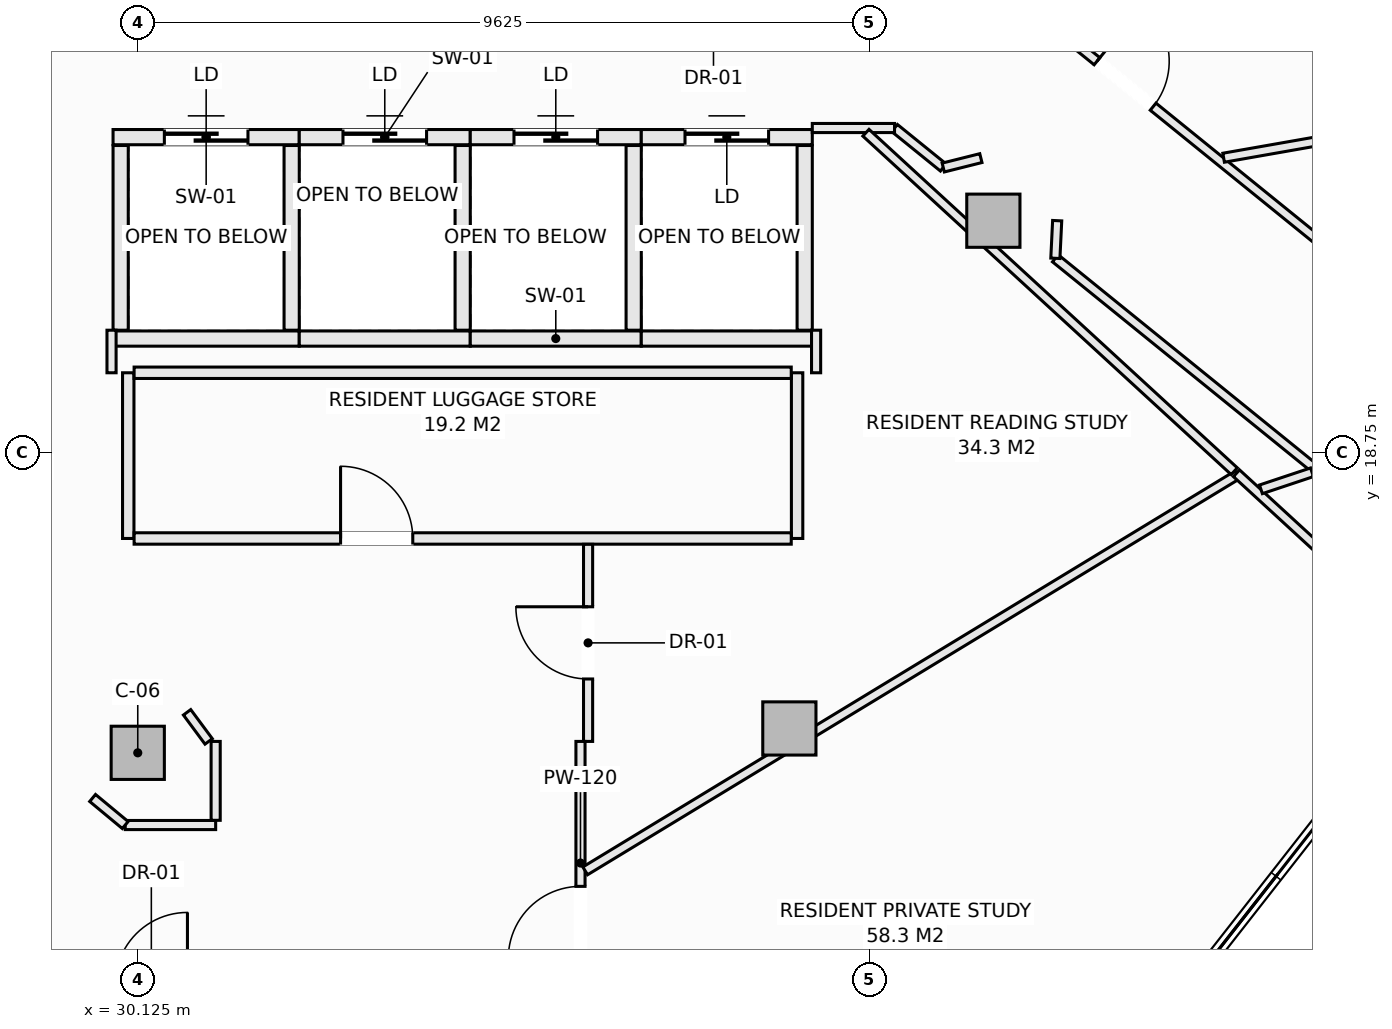
"""IFC4 building model, lengths in metres.
Left out: names, types, materials, properties, quantities, classifications, styles, units other than length and angle.
Written with IfcOpenShell. Run it as: python <this file> out.ifc"""

import sys

from ifc_helpers import new_model, si_unit, direction, frame, frame_2d, origin, origin_2d, place, context, subcontext, project, spatial, rectangle, extrude, element, fill, save


model = new_model("IFC4")
c1 = context("Model", 3, precision=1e-05, world=origin(), true_north=direction((0.0, 1.0)))
c2 = subcontext(c1, "Body", "Model", "MODEL_VIEW")
j1 = project(units=[si_unit("LENGTHUNIT", "METRE"), si_unit("PLANEANGLEUNIT", "RADIAN")], contexts=[c1])
p1 = place(None, origin())
s1 = spatial("IfcSite", under=j1, at=p1, CompositionType="ELEMENT")
p2 = place(p1, origin())
s2 = spatial("IfcBuilding", under=s1, at=p2, CompositionType="ELEMENT")
p3 = place(p2, frame((0.0, 0.0, 219.5)))
s3 = spatial("IfcBuildingStorey", under=s2, at=p3, CompositionType="ELEMENT", Elevation=219.5)
for number, where, z_axis, x_axis in (
    (1, (30.125, 14.8, -0.27), (0.0, 0.0, 1.0), (1.0, 0.0, 0.0)),
    (2, (38.698, 15.121, -0.27), (0.0, 0.0, 1.0), (1.0, 0.0, 0.0)),
    (3, (41.382, 21.801, -0.27), (0.0, 0.0, 1.0), (1.0, 0.0, 0.0)),
):
    element("IfcColumn", number, at=place(p3, frame(where, z_axis=z_axis, x_axis=x_axis)), inside=s3, PredefinedType="COLUMN", context=c2, shape_type="SweptSolid", body=[
        extrude(rectangle(XDim=0.7, YDim=0.7, at=origin_2d()), origin(), (0.0, 0.0, 1.0), 3.3),
    ])
p4 = place(p3, frame((29.8, 22.9, 0.0), z_axis=(0.0, 0.0, 1.0), x_axis=(1.0, 0.0, 0.0)))
e4 = element("IfcWall", 4, at=p4, inside=s3, PredefinedType="SOLIDWALL", context=c2, shape_type="SweptSolid", body=[
    extrude(rectangle(XDim=2.45, YDim=0.2, at=frame_2d((1.225, 0.0))), origin(), (0.0, 0.0, 1.0), 3.03),
])
p5 = place(p4, frame((0.675, 0.0, 0.0)))
e5 = element("IfcOpeningElement", 5, at=p5, cuts=e4, PredefinedType="OPENING", context=c2, shape_type="SweptSolid", body=[
    extrude(rectangle(XDim=1.1, YDim=2.2, at=frame_2d((0.55, 1.1))), frame((0.0, 0.11, 0.0), z_axis=(0.0, -1.0, 0.0), x_axis=(1.0, 0.0, 0.0)), (0.0, 0.0, 1.0), 0.22),
])
p6 = place(p3, frame((29.8, 20.25, 0.0), z_axis=(0.0, 0.0, 1.0), x_axis=(1.0, 0.0, 0.0)))
e6 = element("IfcWall", 6, at=p6, inside=s3, PredefinedType="SOLIDWALL", context=c2, shape_type="SweptSolid", body=[
    extrude(rectangle(XDim=2.45, YDim=0.2, at=frame_2d((1.225, 0.0))), origin(), (0.0, 0.0, 1.0), 3.03),
])
for number, where, z_axis, x_axis in (
    (7, (29.9, 20.36, 0.0), (0.0, 0.0, 1.0), (0.0, 1.0, 0.0)),
    (8, (32.15, 20.36, 0.0), (0.0, 0.0, 1.0), (0.0, 1.0, 0.0)),
):
    element("IfcWall", number, at=place(p3, frame(where, z_axis=z_axis, x_axis=x_axis)), inside=s3, PredefinedType="SOLIDWALL", context=c2, shape_type="SweptSolid", body=[
        extrude(rectangle(XDim=2.43, YDim=0.2, at=frame_2d((1.215, 0.0))), origin(), (0.0, 0.0, 1.0), 3.03),
    ])
p7 = place(p3, frame((32.25, 22.9, 0.0), z_axis=(0.0, 0.0, 1.0), x_axis=(1.0, 0.0, 0.0)))
e9 = element("IfcWall", 9, at=p7, inside=s3, PredefinedType="SOLIDWALL", context=c2, shape_type="SweptSolid", body=[
    extrude(rectangle(XDim=2.25, YDim=0.2, at=frame_2d((1.125, 0.0))), origin(), (0.0, 0.0, 1.0), 3.03),
])
p8 = place(p7, frame((0.575, 0.0, 0.0)))
e10 = element("IfcOpeningElement", 10, at=p8, cuts=e9, PredefinedType="OPENING", context=c2, shape_type="SweptSolid", body=[
    extrude(rectangle(XDim=1.1, YDim=2.2, at=frame_2d((0.55, 1.1))), frame((0.0, 0.11, 0.0), z_axis=(0.0, -1.0, 0.0), x_axis=(1.0, 0.0, 0.0)), (0.0, 0.0, 1.0), 0.22),
])
p9 = place(p3, frame((32.25, 20.25, 0.0), z_axis=(0.0, 0.0, 1.0), x_axis=(1.0, 0.0, 0.0)))
e11 = element("IfcWall", 11, at=p9, inside=s3, PredefinedType="SOLIDWALL", context=c2, shape_type="SweptSolid", body=[
    extrude(rectangle(XDim=2.25, YDim=0.2, at=frame_2d((1.125, 0.0))), origin(), (0.0, 0.0, 1.0), 3.03),
])
p10 = place(p3, frame((34.4, 20.36, 0.0), z_axis=(0.0, 0.0, 1.0), x_axis=(0.0, 1.0, 0.0)))
e12 = element("IfcWall", 12, at=p10, inside=s3, PredefinedType="SOLIDWALL", context=c2, shape_type="SweptSolid", body=[
    extrude(rectangle(XDim=2.43, YDim=0.2, at=frame_2d((1.215, 0.0))), origin(), (0.0, 0.0, 1.0), 3.03),
])
p11 = place(p3, frame((34.5, 22.9, 0.0), z_axis=(0.0, 0.0, 1.0), x_axis=(1.0, 0.0, 0.0)))
e13 = element("IfcWall", 13, at=p11, inside=s3, PredefinedType="SOLIDWALL", context=c2, shape_type="SweptSolid", body=[
    extrude(rectangle(XDim=2.25, YDim=0.2, at=frame_2d((1.125, 0.0))), origin(), (0.0, 0.0, 1.0), 3.03),
])
p12 = place(p11, frame((0.575, 0.0, 0.0)))
e14 = element("IfcOpeningElement", 14, at=p12, cuts=e13, PredefinedType="OPENING", context=c2, shape_type="SweptSolid", body=[
    extrude(rectangle(XDim=1.1, YDim=2.2, at=frame_2d((0.55, 1.1))), frame((0.0, 0.11, 0.0), z_axis=(0.0, -1.0, 0.0), x_axis=(1.0, 0.0, 0.0)), (0.0, 0.0, 1.0), 0.22),
])
p13 = place(p3, frame((34.5, 20.25, 0.0), z_axis=(0.0, 0.0, 1.0), x_axis=(1.0, 0.0, 0.0)))
e15 = element("IfcWall", 15, at=p13, inside=s3, PredefinedType="SOLIDWALL", context=c2, shape_type="SweptSolid", body=[
    extrude(rectangle(XDim=2.25, YDim=0.2, at=frame_2d((1.125, 0.0))), origin(), (0.0, 0.0, 1.0), 3.03),
])
p14 = place(p3, frame((36.65, 20.36, 0.0), z_axis=(0.0, 0.0, 1.0), x_axis=(0.0, 1.0, 0.0)))
e16 = element("IfcWall", 16, at=p14, inside=s3, PredefinedType="SOLIDWALL", context=c2, shape_type="SweptSolid", body=[
    extrude(rectangle(XDim=2.43, YDim=0.2, at=frame_2d((1.215, 0.0))), origin(), (0.0, 0.0, 1.0), 3.03),
])
p15 = place(p3, frame((36.75, 22.9, 0.0), z_axis=(0.0, 0.0, 1.0), x_axis=(1.0, 0.0, 0.0)))
e17 = element("IfcWall", 17, at=p15, inside=s3, PredefinedType="SOLIDWALL", context=c2, shape_type="SweptSolid", body=[
    extrude(rectangle(XDim=2.25, YDim=0.2, at=frame_2d((1.125, 0.0))), origin(), (0.0, 0.0, 1.0), 3.03),
])
p16 = place(p15, frame((0.575, 0.0, 0.0)))
e18 = element("IfcOpeningElement", 18, at=p16, cuts=e17, PredefinedType="OPENING", context=c2, shape_type="SweptSolid", body=[
    extrude(rectangle(XDim=1.1, YDim=2.2, at=frame_2d((0.55, 1.1))), frame((0.0, 0.11, 0.0), z_axis=(0.0, -1.0, 0.0), x_axis=(1.0, 0.0, 0.0)), (0.0, 0.0, 1.0), 0.22),
])
p17 = place(p3, frame((36.75, 20.25, 0.0), z_axis=(0.0, 0.0, 1.0), x_axis=(1.0, 0.0, 0.0)))
e19 = element("IfcWall", 19, at=p17, inside=s3, PredefinedType="SOLIDWALL", context=c2, shape_type="SweptSolid", body=[
    extrude(rectangle(XDim=2.25, YDim=0.2, at=frame_2d((1.125, 0.0))), origin(), (0.0, 0.0, 1.0), 3.03),
])
p18 = place(p3, frame((38.9, 20.36, 0.0), z_axis=(0.0, 0.0, 1.0), x_axis=(0.0, 1.0, 0.0)))
e20 = element("IfcWall", 20, at=p18, inside=s3, PredefinedType="SOLIDWALL", context=c2, shape_type="SweptSolid", body=[
    extrude(rectangle(XDim=2.43, YDim=0.2, at=frame_2d((1.215, 0.0))), origin(), (0.0, 0.0, 1.0), 3.03),
])
for number, where, z_axis, x_axis in (
    (21, (30.0, 17.62, 0.0), (0.0, 0.0, 1.0), (0.0, 1.0, 0.0)),
    (22, (38.8, 17.62, 0.0), (0.0, 0.0, 1.0), (0.0, 1.0, 0.0)),
):
    element("IfcWall", number, at=place(p3, frame(where, z_axis=z_axis, x_axis=x_axis)), inside=s3, PredefinedType="PARTITIONING", context=c2, shape_type="SweptSolid", body=[
        extrude(rectangle(XDim=2.18, YDim=0.15, at=frame_2d((1.09, 0.0))), origin(), (0.0, 0.0, 1.0), 3.03),
    ])
p19 = place(p3, frame((30.077, 17.62, 0.0), z_axis=(0.0, 0.0, 1.0), x_axis=(1.0, 0.0, 0.0)))
e23 = element("IfcWall", 23, at=p19, inside=s3, PredefinedType="PARTITIONING", context=c2, shape_type="SweptSolid", body=[
    extrude(rectangle(XDim=8.646, YDim=0.15, at=frame_2d((4.323, 0.0))), origin(), (0.0, 0.0, 1.0), 3.03),
])
p20 = place(p19, frame((2.717, 0.0, 0.0)))
e24 = element("IfcOpeningElement", 24, at=p20, cuts=e23, PredefinedType="OPENING", context=c2, shape_type="SweptSolid", body=[
    extrude(rectangle(XDim=0.95, YDim=2.1, at=frame_2d((0.475, 1.05))), frame((0.0, 0.085, 0.0), z_axis=(0.0, -1.0, 0.0), x_axis=(1.0, 0.0, 0.0)), (0.0, 0.0, 1.0), 0.17),
])
p21 = place(p3, frame((30.077, 19.8, 0.0), z_axis=(0.0, 0.0, 1.0), x_axis=(1.0, 0.0, 0.0)))
e25 = element("IfcWall", 25, at=p21, inside=s3, PredefinedType="PARTITIONING", context=c2, shape_type="SweptSolid", body=[
    extrude(rectangle(XDim=8.646, YDim=0.15, at=frame_2d((4.323, 0.0))), origin(), (0.0, 0.0, 1.0), 3.03),
])
p22 = place(p3, frame((39.05, 19.8, 0.0), z_axis=(0.0, 0.0, 1.0), x_axis=(0.0, 1.0, 0.0)))
e26 = element("IfcWall", 26, at=p22, inside=s3, PredefinedType="PARTITIONING", context=c2, shape_type="SweptSolid", body=[
    extrude(rectangle(XDim=0.56, YDim=0.12, at=frame_2d((0.28, 0.0))), origin(), (0.0, 0.0, 1.0), 3.03),
])
p23 = place(p3, frame((41.52, 24.892, 0.0), z_axis=(0.0, 0.0, 1.0), x_axis=(0.777027167904, -0.629467060567, 0.0)))
e27 = element("IfcWall", 27, at=p23, inside=s3, PredefinedType="PARTITIONING", context=c2, shape_type="SweptSolid", body=[
    extrude(rectangle(XDim=8.62, YDim=0.12, at=frame_2d((4.31, 0.0))), origin(), (0.0, 0.0, 1.0), 2.77),
])
p24 = place(p23, frame((5.4, 0.0, 0.0)))
e28 = element("IfcOpeningElement", 28, at=p24, cuts=e27, PredefinedType="OPENING", context=c2, shape_type="SweptSolid", body=[
    extrude(rectangle(XDim=0.95, YDim=2.1, at=frame_2d((0.475, 1.05))), frame((0.0, 0.07, 0.0), z_axis=(0.0, -1.0, 0.0), x_axis=(1.0, 0.0, 0.0)), (0.0, 0.0, 1.0), 0.14),
])
p25 = place(p23, frame((1.578, 0.0, 0.0)))
e29 = element("IfcOpeningElement", 29, at=p25, cuts=e27, PredefinedType="OPENING", context=c2, shape_type="SweptSolid", body=[
    extrude(rectangle(XDim=0.95, YDim=2.1, at=frame_2d((0.475, 1.05))), frame((0.0, 0.07, 0.0), z_axis=(0.0, -1.0, 0.0), x_axis=(1.0, 0.0, 0.0)), (0.0, 0.0, 1.0), 0.14),
])
p26 = place(p3, frame((40.082, 23.02, 0.0), z_axis=(0.0, 0.0, 1.0), x_axis=(0.776900403314, -0.629623509195, 0.0)))
e30 = element("IfcWall", 30, at=p26, inside=s3, PredefinedType="PARTITIONING", context=c2, shape_type="SweptSolid", body=[
    extrude(rectangle(XDim=0.825, YDim=0.12, at=frame_2d((0.413, 0.0))), origin(), (0.0, 0.0, 1.0), 3.03),
])
p27 = place(p3, frame((42.198, 21.306, 0.0), z_axis=(0.0, 0.0, 1.0), x_axis=(0.777012245854, -0.629485480208, 0.0)))
e31 = element("IfcWall", 31, at=p27, inside=s3, PredefinedType="PARTITIONING", context=c2, shape_type="SweptSolid", body=[
    extrude(rectangle(XDim=4.718, YDim=0.12, at=frame_2d((2.359, 0.0))), origin(), (0.0, 0.0, 1.0), 2.77),
])
p28 = place(p3, frame((42.198, 21.306, 0.0), z_axis=(0.0, 0.0, 1.0), x_axis=(0.048267148556, 0.998834461946, 0.0)))
e32 = element("IfcWall", 32, at=p28, inside=s3, PredefinedType="PARTITIONING", context=c2, shape_type="SweptSolid", body=[
    extrude(rectangle(XDim=0.496, YDim=0.12, at=frame_2d((0.248, 0.0))), origin(), (0.0, 0.0, 1.0), 3.03),
])
p29 = place(p3, frame((40.723, 22.5, 0.0), z_axis=(0.0, 0.0, 1.0), x_axis=(0.970029850173, 0.24298578101, 0.0)))
e33 = element("IfcWall", 33, at=p29, inside=s3, PredefinedType="PARTITIONING", context=c2, shape_type="SweptSolid", body=[
    extrude(rectangle(XDim=0.51, YDim=0.12, at=frame_2d((0.255, 0.0))), origin(), (0.0, 0.0, 1.0), 3.03),
])
p30 = place(p3, frame((39.0, 23.02, 0.0), z_axis=(0.0, 0.0, 1.0), x_axis=(1.0, 0.0, 0.0)))
e34 = element("IfcWall", 34, at=p30, inside=s3, PredefinedType="PARTITIONING", context=c2, shape_type="SweptSolid", body=[
    extrude(rectangle(XDim=1.082, YDim=0.12, at=frame_2d((0.541, 0.0))), origin(), (0.0, 0.0, 1.0), 3.03),
])
p31 = place(p3, frame((29.78, 19.8, 0.0), z_axis=(0.0, 0.0, 1.0), x_axis=(0.0, 1.0, 0.0)))
e35 = element("IfcWall", 35, at=p31, inside=s3, PredefinedType="PARTITIONING", context=c2, shape_type="SweptSolid", body=[
    extrude(rectangle(XDim=0.56, YDim=0.12, at=frame_2d((0.28, 0.0))), origin(), (0.0, 0.0, 1.0), 3.03),
])
p32 = place(p3, frame((36.05, 14.95, 0.0), z_axis=(0.0, 0.0, 1.0), x_axis=(0.0, 1.0, 0.0)))
e36 = element("IfcWall", 36, at=p32, inside=s3, PredefinedType="PARTITIONING", context=c2, shape_type="SweptSolid", body=[
    extrude(rectangle(XDim=2.593, YDim=0.12, at=frame_2d((1.296, 0.0))), origin(), (0.0, 0.0, 1.0), 3.03),
])
p33 = place(p32, frame((0.822, 0.0, 0.0)))
e37 = element("IfcOpeningElement", 37, at=p33, cuts=e36, PredefinedType="OPENING", context=c2, shape_type="SweptSolid", body=[
    extrude(rectangle(XDim=0.95, YDim=2.1, at=frame_2d((0.475, 1.05))), frame((0.0, 0.07, 0.0), z_axis=(0.0, -1.0, 0.0), x_axis=(1.0, 0.0, 0.0)), (0.0, 0.0, 1.0), 0.14),
])
p34 = place(p3, frame((35.95, 11.75, 0.0), z_axis=(0.0, 0.0, 1.0), x_axis=(0.0, 1.0, 0.0)))
e38 = element("IfcWall", 38, at=p34, inside=s3, PredefinedType="PARTITIONING", context=c2, shape_type="SweptSolid", body=[
    extrude(rectangle(XDim=3.2, YDim=0.12, at=frame_2d((1.6, 0.0))), origin(), (0.0, 0.0, 1.0), 3.03),
])
p35 = place(p34, frame((0.343, 0.0, 0.0)))
e39 = element("IfcOpeningElement", 39, at=p35, cuts=e38, PredefinedType="OPENING", context=c2, shape_type="SweptSolid", body=[
    extrude(rectangle(XDim=0.95, YDim=2.1, at=frame_2d((0.475, 1.05))), frame((0.0, 0.07, 0.0), z_axis=(0.0, -1.0, 0.0), x_axis=(1.0, 0.0, 0.0)), (0.0, 0.0, 1.0), 0.14),
])
p36 = place(p3, frame((29.96, 13.85, 0.0), z_axis=(0.0, 0.0, 1.0), x_axis=(1.0, 0.0, 0.0)))
e40 = element("IfcWall", 40, at=p36, inside=s3, PredefinedType="PARTITIONING", context=c2, shape_type="SweptSolid", body=[
    extrude(rectangle(XDim=1.19, YDim=0.12, at=frame_2d((0.595, 0.0))), origin(), (0.0, 0.0, 1.0), 3.03),
])
p37 = place(p3, frame((31.15, 13.912, 0.0), z_axis=(0.0, 0.0, 1.0), x_axis=(0.0, 1.0, 0.0)))
e41 = element("IfcWall", 41, at=p37, inside=s3, PredefinedType="PARTITIONING", context=c2, shape_type="SweptSolid", body=[
    extrude(rectangle(XDim=1.038, YDim=0.12, at=frame_2d((0.519, 0.0))), origin(), (0.0, 0.0, 1.0), 3.03),
])
p38 = place(p3, frame((30.774, 15.333, 0.0), z_axis=(0.0, 0.0, 1.0), x_axis=(0.595814974861, -0.803121731577, 0.0)))
e42 = element("IfcWall", 42, at=p38, inside=s3, PredefinedType="PARTITIONING", context=c2, shape_type="SweptSolid", body=[
    extrude(rectangle(XDim=0.477, YDim=0.12, at=frame_2d((0.239, 0.0))), origin(), (0.0, 0.0, 1.0), 3.03),
])
p39 = place(p3, frame((29.531, 14.206, 0.0), z_axis=(0.0, 0.0, 1.0), x_axis=(0.7695479554, -0.638589026166, 0.0)))
e43 = element("IfcWall", 43, at=p39, inside=s3, PredefinedType="PARTITIONING", context=c2, shape_type="SweptSolid", body=[
    extrude(rectangle(XDim=0.557, YDim=0.12, at=frame_2d((0.279, 0.0))), origin(), (0.0, 0.0, 1.0), 3.03),
])
p40 = place(p3, frame((36.012, 13.247, 0.0), z_axis=(0.0, 0.0, 1.0), x_axis=(0.85474937032, 0.519040955934, 0.0)))
e44 = element("IfcWall", 44, at=p40, inside=s3, PredefinedType="PARTITIONING", context=c2, shape_type="SweptSolid", body=[
    extrude(rectangle(XDim=10.04, YDim=0.12, at=frame_2d((5.02, 0.0))), origin(), (0.0, 0.0, 1.0), 3.03),
])
p41 = place(p3, frame((39.706, 22.958, 0.0), z_axis=(0.0, 0.0, 1.0), x_axis=(0.73633751064, -0.676614417837, 0.0)))
e45 = element("IfcWall", 45, at=p41, inside=s3, PredefinedType="PARTITIONING", context=c2, shape_type="SweptSolid", body=[
    extrude(rectangle(XDim=6.582, YDim=0.12, at=frame_2d((3.291, 0.0))), origin(), (0.0, 0.0, 1.0), 3.03),
])
p42 = place(p3, frame((44.581, 18.478, 0.0), z_axis=(0.0, 0.0, 1.0), x_axis=(0.736361674887, -0.676588119729, 0.0)))
e46 = element("IfcWall", 46, at=p42, inside=s3, PredefinedType="PARTITIONING", context=c2, shape_type="SweptSolid", body=[
    extrude(rectangle(XDim=4.427, YDim=0.12, at=frame_2d((2.214, 0.0))), origin(), (0.0, 0.0, 1.0), 3.03),
])
p43 = place(p3, frame((44.903, 18.267, 0.0), z_axis=(0.0, 0.0, 1.0), x_axis=(0.948614335511, 0.316434578488, 0.0)))
e47 = element("IfcWall", 47, at=p43, inside=s3, PredefinedType="PARTITIONING", context=c2, shape_type="SweptSolid", body=[
    extrude(rectangle(XDim=0.708, YDim=0.12, at=frame_2d((0.354, 0.0))), origin(), (0.0, 0.0, 1.0), 3.03),
])
p44 = place(p3, frame((44.412, 22.629, 0.0), z_axis=(0.0, 0.0, 1.0), x_axis=(0.984937605234, 0.172910132136, 0.0)))
e48 = element("IfcWall", 48, at=p44, inside=s3, PredefinedType="PARTITIONING", context=c2, shape_type="SweptSolid", body=[
    extrude(rectangle(XDim=10.026, YDim=0.12, at=frame_2d((5.013, 0.0))), origin(), (0.0, 0.0, 1.0), 2.77),
])
p45 = place(p5, origin())
e49 = element("IfcDoor", 49, at=p45, inside=s3, OperationType="SLIDING_TO_LEFT", PredefinedType="DOOR", context=c2, shape_type="SweptSolid", body=[
    extrude(rectangle(XDim=1.1, YDim=2.2, at=frame_2d((0.55, 1.1))), frame((0.0, 0.025, 0.0), z_axis=(0.0, -1.0, 0.0), x_axis=(1.0, 0.0, 0.0)), (0.0, 0.0, 1.0), 0.05),
])
fill(e5, e49)
p46 = place(p8, origin())
e50 = element("IfcDoor", 50, at=p46, inside=s3, OperationType="SLIDING_TO_LEFT", PredefinedType="DOOR", context=c2, shape_type="SweptSolid", body=[
    extrude(rectangle(XDim=1.1, YDim=2.2, at=frame_2d((0.55, 1.1))), frame((0.0, 0.025, 0.0), z_axis=(0.0, -1.0, 0.0), x_axis=(1.0, 0.0, 0.0)), (0.0, 0.0, 1.0), 0.05),
])
fill(e10, e50)
p47 = place(p12, origin())
e51 = element("IfcDoor", 51, at=p47, inside=s3, OperationType="SLIDING_TO_LEFT", PredefinedType="DOOR", context=c2, shape_type="SweptSolid", body=[
    extrude(rectangle(XDim=1.1, YDim=2.2, at=frame_2d((0.55, 1.1))), frame((0.0, 0.025, 0.0), z_axis=(0.0, -1.0, 0.0), x_axis=(1.0, 0.0, 0.0)), (0.0, 0.0, 1.0), 0.05),
])
fill(e14, e51)
p48 = place(p16, origin())
e52 = element("IfcDoor", 52, at=p48, inside=s3, OperationType="SLIDING_TO_LEFT", PredefinedType="DOOR", context=c2, shape_type="SweptSolid", body=[
    extrude(rectangle(XDim=1.1, YDim=2.2, at=frame_2d((0.55, 1.1))), frame((0.0, 0.025, 0.0), z_axis=(0.0, -1.0, 0.0), x_axis=(1.0, 0.0, 0.0)), (0.0, 0.0, 1.0), 0.05),
])
fill(e18, e52)
p49 = place(p20, origin())
e53 = element("IfcDoor", 53, at=p49, inside=s3, OperationType="SINGLE_SWING_LEFT", PredefinedType="DOOR", context=c2, shape_type="SweptSolid", body=[
    extrude(rectangle(XDim=0.95, YDim=2.1, at=frame_2d((0.475, 1.05))), frame((0.0, 0.025, 0.0), z_axis=(0.0, -1.0, 0.0), x_axis=(1.0, 0.0, 0.0)), (0.0, 0.0, 1.0), 0.05),
])
fill(e24, e53)
p50 = place(p35, origin())
e54 = element("IfcDoor", 54, at=p50, inside=s3, OperationType="SINGLE_SWING_LEFT", PredefinedType="DOOR", context=c2, shape_type="SweptSolid", body=[
    extrude(rectangle(XDim=0.95, YDim=2.1, at=frame_2d((0.475, 1.05))), frame((0.0, 0.025, 0.0), z_axis=(0.0, -1.0, 0.0), x_axis=(1.0, 0.0, 0.0)), (0.0, 0.0, 1.0), 0.05),
])
fill(e39, e54)
p51 = place(p33, origin())
e55 = element("IfcDoor", 55, at=p51, inside=s3, OperationType="SINGLE_SWING_RIGHT", PredefinedType="DOOR", context=c2, shape_type="SweptSolid", body=[
    extrude(rectangle(XDim=0.95, YDim=2.1, at=frame_2d((0.475, 1.05))), frame((0.0, 0.025, 0.0), z_axis=(0.0, -1.0, 0.0), x_axis=(1.0, 0.0, 0.0)), (0.0, 0.0, 1.0), 0.05),
])
fill(e37, e55)
p52 = place(p25, origin())
e56 = element("IfcDoor", 56, at=p52, inside=s3, OperationType="SINGLE_SWING_LEFT", PredefinedType="DOOR", context=c2, shape_type="SweptSolid", body=[
    extrude(rectangle(XDim=0.95, YDim=2.1, at=frame_2d((0.475, 1.05))), frame((0.0, 0.025, 0.0), z_axis=(0.0, -1.0, 0.0), x_axis=(1.0, 0.0, 0.0)), (0.0, 0.0, 1.0), 0.05),
])
fill(e29, e56)
save(model, sys.argv[1])
